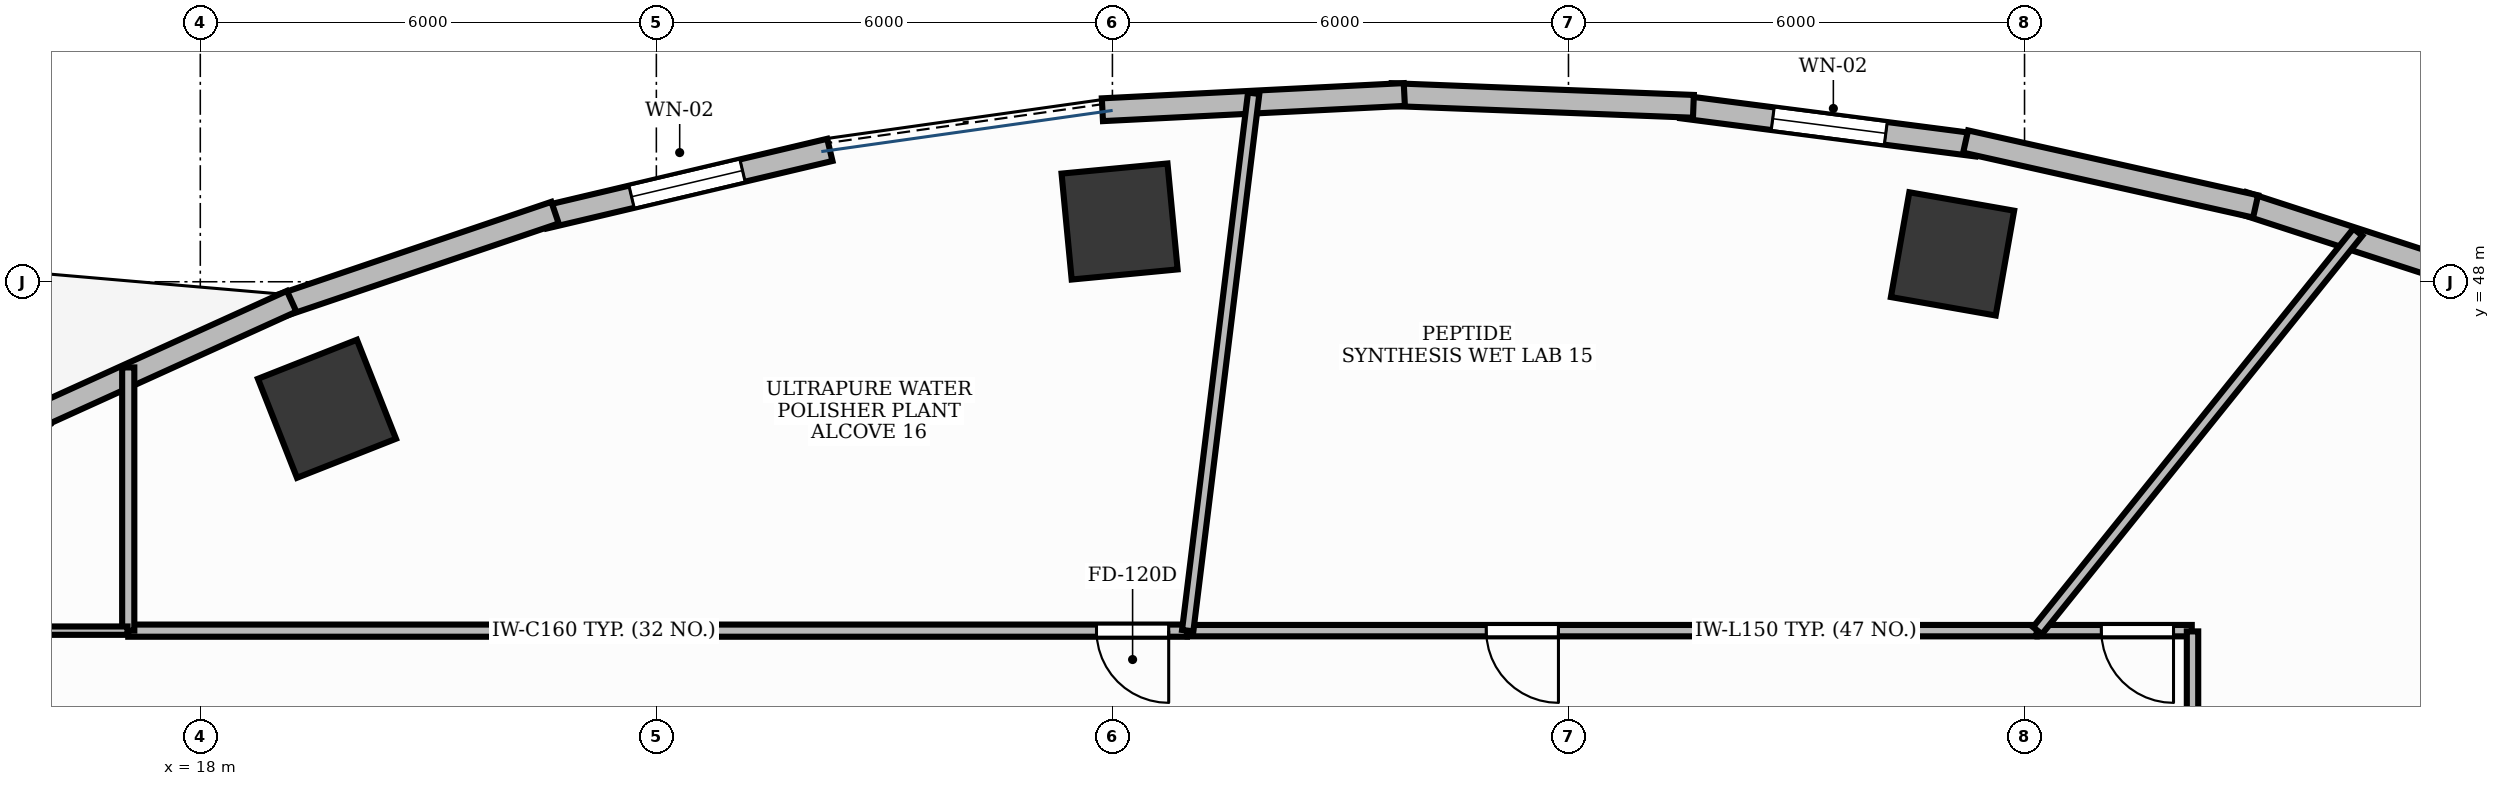
"""IFC4 building model, lengths in metres.
Left out: names, types, materials, properties, quantities, classifications, styles, units other than length and angle.
Written with IfcOpenShell. Run it as: python <this file> out.ifc"""

import sys

from ifc_helpers import new_model, si_unit, direction, frame, frame_2d, origin, origin_2d, place, context, subcontext, project, spatial, rectangle, extrude, element, fill, save


model = new_model("IFC4")
c1 = context("Model", 3, precision=1e-05, world=origin(), true_north=direction((0.0, 1.0)))
c2 = subcontext(c1, "Body", "Model", "MODEL_VIEW")
j1 = project(units=[si_unit("LENGTHUNIT", "METRE"), si_unit("PLANEANGLEUNIT", "RADIAN")], contexts=[c1])
p1 = place(None, origin())
s1 = spatial("IfcSite", under=j1, at=p1, CompositionType="ELEMENT")
p2 = place(p1, origin())
s2 = spatial("IfcBuilding", under=s1, at=p2, CompositionType="ELEMENT")
p3 = place(p2, frame((0.0, 0.0, 55.2)))
s3 = spatial("IfcBuildingStorey", under=s2, at=p3, CompositionType="ELEMENT", Elevation=55.2)
for number, where, z_axis, x_axis in (
    (1, (41.052, 48.367, -0.0), (0.0, 0.0, 1.0), (-0.985, 0.173, 0.0)),
    (2, (30.094, 48.792, -0.0), (0.0, 0.0, 1.0), (0.995, 0.095, 0.0)),
    (3, (19.667, 46.329, -0.0), (0.0, 0.0, 1.0), (0.93, 0.367, 0.0)),
):
    element("IfcColumn", number, at=place(p3, frame(where, z_axis=z_axis, x_axis=x_axis)), inside=s3, PredefinedType="COLUMN", context=c2, shape_type="SweptSolid", body=[
        extrude(rectangle(XDim=1.4, YDim=1.4, at=origin_2d()), origin(), (0.0, 0.0, 1.0), 3.901),
    ])
p4 = place(p3, frame((41.373, 49.798, 0.0), z_axis=(0.0, 0.0, 1.0), x_axis=(-0.991741322416, 0.128254237408, 0.0)))
e4 = element("IfcWall", 4, at=p4, inside=s3, PredefinedType="STANDARD", context=c2, shape_type="SweptSolid", body=[
    extrude(rectangle(XDim=3.916, YDim=0.3, at=frame_2d((1.958, 0.0))), origin(), (0.0, 0.0, 1.0), 3.47),
])
p5 = place(p4, frame((1.208, 0.0, 0.95)))
e5 = element("IfcOpeningElement", 5, at=p5, cuts=e4, PredefinedType="OPENING", context=c2, shape_type="SweptSolid", body=[
    extrude(rectangle(XDim=1.5, YDim=1.8, at=frame_2d((0.75, 0.9))), frame((0.0, 0.165, 0.0), z_axis=(0.0, -1.0, 0.0), x_axis=(1.0, 0.0, 0.0)), (0.0, 0.0, 1.0), 0.33),
])
p6 = place(p3, frame((26.282, 49.735, 0.0), z_axis=(0.0, 0.0, 1.0), x_axis=(-0.973186156802, -0.230018921417, 0.0)))
e6 = element("IfcWall", 6, at=p6, inside=s3, PredefinedType="STANDARD", context=c2, shape_type="SweptSolid", body=[
    extrude(rectangle(XDim=3.861, YDim=0.3, at=frame_2d((1.931, 0.0))), origin(), (0.0, 0.0, 1.0), 3.9),
])
p7 = place(p6, frame((1.181, 0.0, 0.95)))
e7 = element("IfcOpeningElement", 7, at=p7, cuts=e6, PredefinedType="OPENING", context=c2, shape_type="SweptSolid", body=[
    extrude(rectangle(XDim=1.5, YDim=1.8, at=frame_2d((0.75, 0.9))), frame((0.0, 0.165, 0.0), z_axis=(0.0, -1.0, 0.0), x_axis=(1.0, 0.0, 0.0)), (0.0, 0.0, 1.0), 0.33),
])
p8 = place(p3, frame((48.525, 47.849, 0.0), z_axis=(0.0, 0.0, 1.0), x_axis=(-0.950965833732, 0.309295947393, 0.0)))
e8 = element("IfcWall", 8, at=p8, inside=s3, PredefinedType="STANDARD", context=c2, shape_type="SweptSolid", body=[
    extrude(rectangle(XDim=3.84, YDim=0.3, at=frame_2d((1.92, 0.0))), origin(), (0.0, 0.0, 1.0), 3.9),
])
p9 = place(p3, frame((45.04, 48.991, 0.0), z_axis=(0.0, 0.0, 1.0), x_axis=(-0.975868573345, 0.218358713032, 0.0)))
e9 = element("IfcWall", 9, at=p9, inside=s3, PredefinedType="STANDARD", context=c2, shape_type="SweptSolid", body=[
    extrude(rectangle(XDim=3.909, YDim=0.3, at=frame_2d((1.954, 0.0))), origin(), (0.0, 0.0, 1.0), 3.9),
])
p10 = place(p3, frame((37.644, 50.308, 0.0), z_axis=(0.0, 0.0, 1.0), x_axis=(-0.999245411623, 0.038840794937, 0.0)))
e10 = element("IfcWall", 10, at=p10, inside=s3, PredefinedType="STANDARD", context=c2, shape_type="SweptSolid", body=[
    extrude(rectangle(XDim=3.979, YDim=0.3, at=frame_2d((1.989, 0.0))), origin(), (0.0, 0.0, 1.0), 3.9),
])
p11 = place(p3, frame((33.84, 50.463, 0.0), z_axis=(0.0, 0.0, 1.0), x_axis=(-0.998732359232, -0.050335619826, 0.0)))
e11 = element("IfcWall", 11, at=p11, inside=s3, PredefinedType="STANDARD", context=c2, shape_type="SweptSolid", body=[
    extrude(rectangle(XDim=3.977, YDim=0.3, at=frame_2d((1.989, 0.0))), origin(), (0.0, 0.0, 1.0), 3.47),
])
p12 = place(p3, frame((22.667, 48.909, 0.0), z_axis=(0.0, 0.0, 1.0), x_axis=(-0.94702579403, -0.321157508773, 0.0)))
e12 = element("IfcWall", 12, at=p12, inside=s3, PredefinedType="STANDARD", context=c2, shape_type="SweptSolid", body=[
    extrude(rectangle(XDim=3.83, YDim=0.3, at=frame_2d((1.915, 0.0))), origin(), (0.0, 0.0, 1.0), 3.9),
])
p13 = place(p3, frame((19.201, 47.743, 0.0), z_axis=(0.0, 0.0, 1.0), x_axis=(-0.910623406862, -0.413237233166, 0.0)))
e13 = element("IfcWall", 13, at=p13, inside=s3, PredefinedType="STANDARD", context=c2, shape_type="SweptSolid", body=[
    extrude(rectangle(XDim=3.74, YDim=0.3, at=frame_2d((1.87, 0.0))), origin(), (0.0, 0.0, 1.0), 3.9),
])
p14 = place(p3, frame((44.2, 43.41, 0.0), z_axis=(0.0, 0.0, 1.0), x_axis=(-1.0, 0.0, 0.0)))
e14 = element("IfcWall", 14, at=p14, inside=s3, PredefinedType="PARTITIONING", context=c2, shape_type="SweptSolid", body=[
    extrude(rectangle(XDim=2.03, YDim=0.15, at=frame_2d((1.015, 0.0))), origin(), (0.0, 0.0, 1.0), 2.91),
])
p15 = place(p14, frame((0.24, 0.0, 0.0)))
e15 = element("IfcOpeningElement", 15, at=p15, cuts=e14, PredefinedType="OPENING", context=c2, shape_type="SweptSolid", body=[
    extrude(rectangle(XDim=0.95, YDim=2.15, at=frame_2d((0.475, 1.075))), frame((0.0, 0.09, 0.0), z_axis=(0.0, -1.0, 0.0), x_axis=(1.0, 0.0, 0.0)), (0.0, 0.0, 1.0), 0.18),
])
p16 = place(p3, frame((42.16, 43.41, 0.0), z_axis=(0.0, 0.0, 1.0), x_axis=(-1.0, 0.0, 0.0)))
e16 = element("IfcWall", 16, at=p16, inside=s3, PredefinedType="PARTITIONING", context=c2, shape_type="SweptSolid", body=[
    extrude(rectangle(XDim=11.17, YDim=0.15, at=frame_2d((5.585, 0.0))), origin(), (0.0, 0.0, 1.0), 2.91),
])
p17 = place(p16, frame((6.292, 0.0, 0.0)))
e17 = element("IfcOpeningElement", 17, at=p17, cuts=e16, PredefinedType="OPENING", context=c2, shape_type="SweptSolid", body=[
    extrude(rectangle(XDim=0.95, YDim=2.15, at=frame_2d((0.475, 1.075))), frame((0.0, 0.09, 0.0), z_axis=(0.0, -1.0, 0.0), x_axis=(1.0, 0.0, 0.0)), (0.0, 0.0, 1.0), 0.18),
])
p18 = place(p3, frame((30.98, 43.41, 0.0), z_axis=(0.0, 0.0, 1.0), x_axis=(-1.0, 0.0, 0.0)))
e18 = element("IfcWall", 18, at=p18, inside=s3, PredefinedType="PARTITIONING", context=c2, shape_type="SweptSolid", body=[
    extrude(rectangle(XDim=13.928, YDim=0.16, at=frame_2d((6.964, 0.0))), origin(), (0.0, 0.0, 1.0), 2.91),
])
p19 = place(p18, frame((0.24, 0.0, 0.0)))
e19 = element("IfcOpeningElement", 19, at=p19, cuts=e18, PredefinedType="OPENING", context=c2, shape_type="SweptSolid", body=[
    extrude(rectangle(XDim=0.95, YDim=2.15, at=frame_2d((0.475, 1.075))), frame((0.0, 0.095, 0.0), z_axis=(0.0, -1.0, 0.0), x_axis=(1.0, 0.0, 0.0)), (0.0, 0.0, 1.0), 0.19),
])
p20 = place(p3, frame((44.21, 35.958, 0.0), z_axis=(0.0, 0.0, 1.0), x_axis=(0.0, 1.0, 0.0)))
e20 = element("IfcWall", 20, at=p20, inside=s3, PredefinedType="PARTITIONING", context=c2, shape_type="SweptSolid", body=[
    extrude(rectangle(XDim=7.442, YDim=0.15, at=frame_2d((3.721, 0.0))), origin(), (0.0, 0.0, 1.0), 2.91),
])
p21 = place(p3, frame((42.17, 43.41, 0.0), z_axis=(0.0, 0.0, 1.0), x_axis=(0.626591923984, 0.779347522481, 0.0)))
e21 = element("IfcWall", 21, at=p21, inside=s3, PredefinedType="PARTITIONING", context=c2, shape_type="SweptSolid", body=[
    extrude(rectangle(XDim=6.727, YDim=0.15, at=frame_2d((3.364, 0.0))), origin(), (0.0, 0.0, 1.0), 2.91),
])
p22 = place(p3, frame((30.99, 43.41, 0.0), z_axis=(0.0, 0.0, 1.0), x_axis=(0.121849241754, 0.992548619607, 0.0)))
e22 = element("IfcWall", 22, at=p22, inside=s3, PredefinedType="PARTITIONING", context=c2, shape_type="SweptSolid", body=[
    extrude(rectangle(XDim=7.123, YDim=0.15, at=frame_2d((3.562, 0.0))), origin(), (0.0, 0.0, 1.0), 2.91),
])
p23 = place(p3, frame((17.052, 43.41, 0.0), z_axis=(0.0, 0.0, 1.0), x_axis=(0.0, 1.0, 0.0)))
e23 = element("IfcWall", 23, at=p23, inside=s3, PredefinedType="PARTITIONING", context=c2, shape_type="SweptSolid", body=[
    extrude(rectangle(XDim=3.463, YDim=0.16, at=frame_2d((1.731, 0.0))), origin(), (0.0, 0.0, 1.0), 2.91),
])
p24 = place(p3, frame((17.042, 43.41, 0.0), z_axis=(0.0, 0.0, 1.0), x_axis=(-1.0, 0.0, 0.0)))
e24 = element("IfcWall", 24, at=p24, inside=s3, PredefinedType="MOVABLE", context=c2, shape_type="SweptSolid", body=[
    extrude(rectangle(XDim=1.451, YDim=0.11, at=frame_2d((0.726, 0.0))), origin(), (0.0, 0.0, 1.0), 2.91),
])
p25 = place(p5, origin())
e25 = element("IfcWindow", 25, at=p25, inside=s3, PartitioningType="DOUBLE_PANEL_VERTICAL", PredefinedType="WINDOW", context=c2, shape_type="SweptSolid", body=[
    extrude(rectangle(XDim=1.5, YDim=1.8, at=frame_2d((0.75, 0.9))), frame((0.0, 0.03, 0.0), z_axis=(0.0, -1.0, 0.0), x_axis=(1.0, 0.0, 0.0)), (0.0, 0.0, 1.0), 0.06),
])
fill(e5, e25)
p26 = place(p7, origin())
e26 = element("IfcWindow", 26, at=p26, inside=s3, PartitioningType="DOUBLE_PANEL_VERTICAL", PredefinedType="WINDOW", context=c2, shape_type="SweptSolid", body=[
    extrude(rectangle(XDim=1.5, YDim=1.8, at=frame_2d((0.75, 0.9))), frame((0.0, 0.03, 0.0), z_axis=(0.0, -1.0, 0.0), x_axis=(1.0, 0.0, 0.0)), (0.0, 0.0, 1.0), 0.06),
])
fill(e7, e26)
p27 = place(p15, origin())
e27 = element("IfcDoor", 27, at=p27, inside=s3, OperationType="SINGLE_SWING_LEFT", PredefinedType="DOOR", context=c2, shape_type="SweptSolid", body=[
    extrude(rectangle(XDim=0.95, YDim=2.15, at=frame_2d((0.475, 1.075))), frame((0.0, 0.025, 0.0), z_axis=(0.0, -1.0, 0.0), x_axis=(1.0, 0.0, 0.0)), (0.0, 0.0, 1.0), 0.05),
])
fill(e15, e27)
p28 = place(p17, origin())
e28 = element("IfcDoor", 28, at=p28, inside=s3, OperationType="SINGLE_SWING_LEFT", PredefinedType="DOOR", context=c2, shape_type="SweptSolid", body=[
    extrude(rectangle(XDim=0.95, YDim=2.15, at=frame_2d((0.475, 1.075))), frame((0.0, 0.025, 0.0), z_axis=(0.0, -1.0, 0.0), x_axis=(1.0, 0.0, 0.0)), (0.0, 0.0, 1.0), 0.05),
])
fill(e17, e28)
p29 = place(p19, origin())
e29 = element("IfcDoor", 29, at=p29, inside=s3, OperationType="SINGLE_SWING_LEFT", PredefinedType="DOOR", context=c2, shape_type="SweptSolid", body=[
    extrude(rectangle(XDim=0.95, YDim=2.15, at=frame_2d((0.475, 1.075))), frame((0.0, 0.025, 0.0), z_axis=(0.0, -1.0, 0.0), x_axis=(1.0, 0.0, 0.0)), (0.0, 0.0, 1.0), 0.05),
])
fill(e19, e29)
save(model, sys.argv[1])
